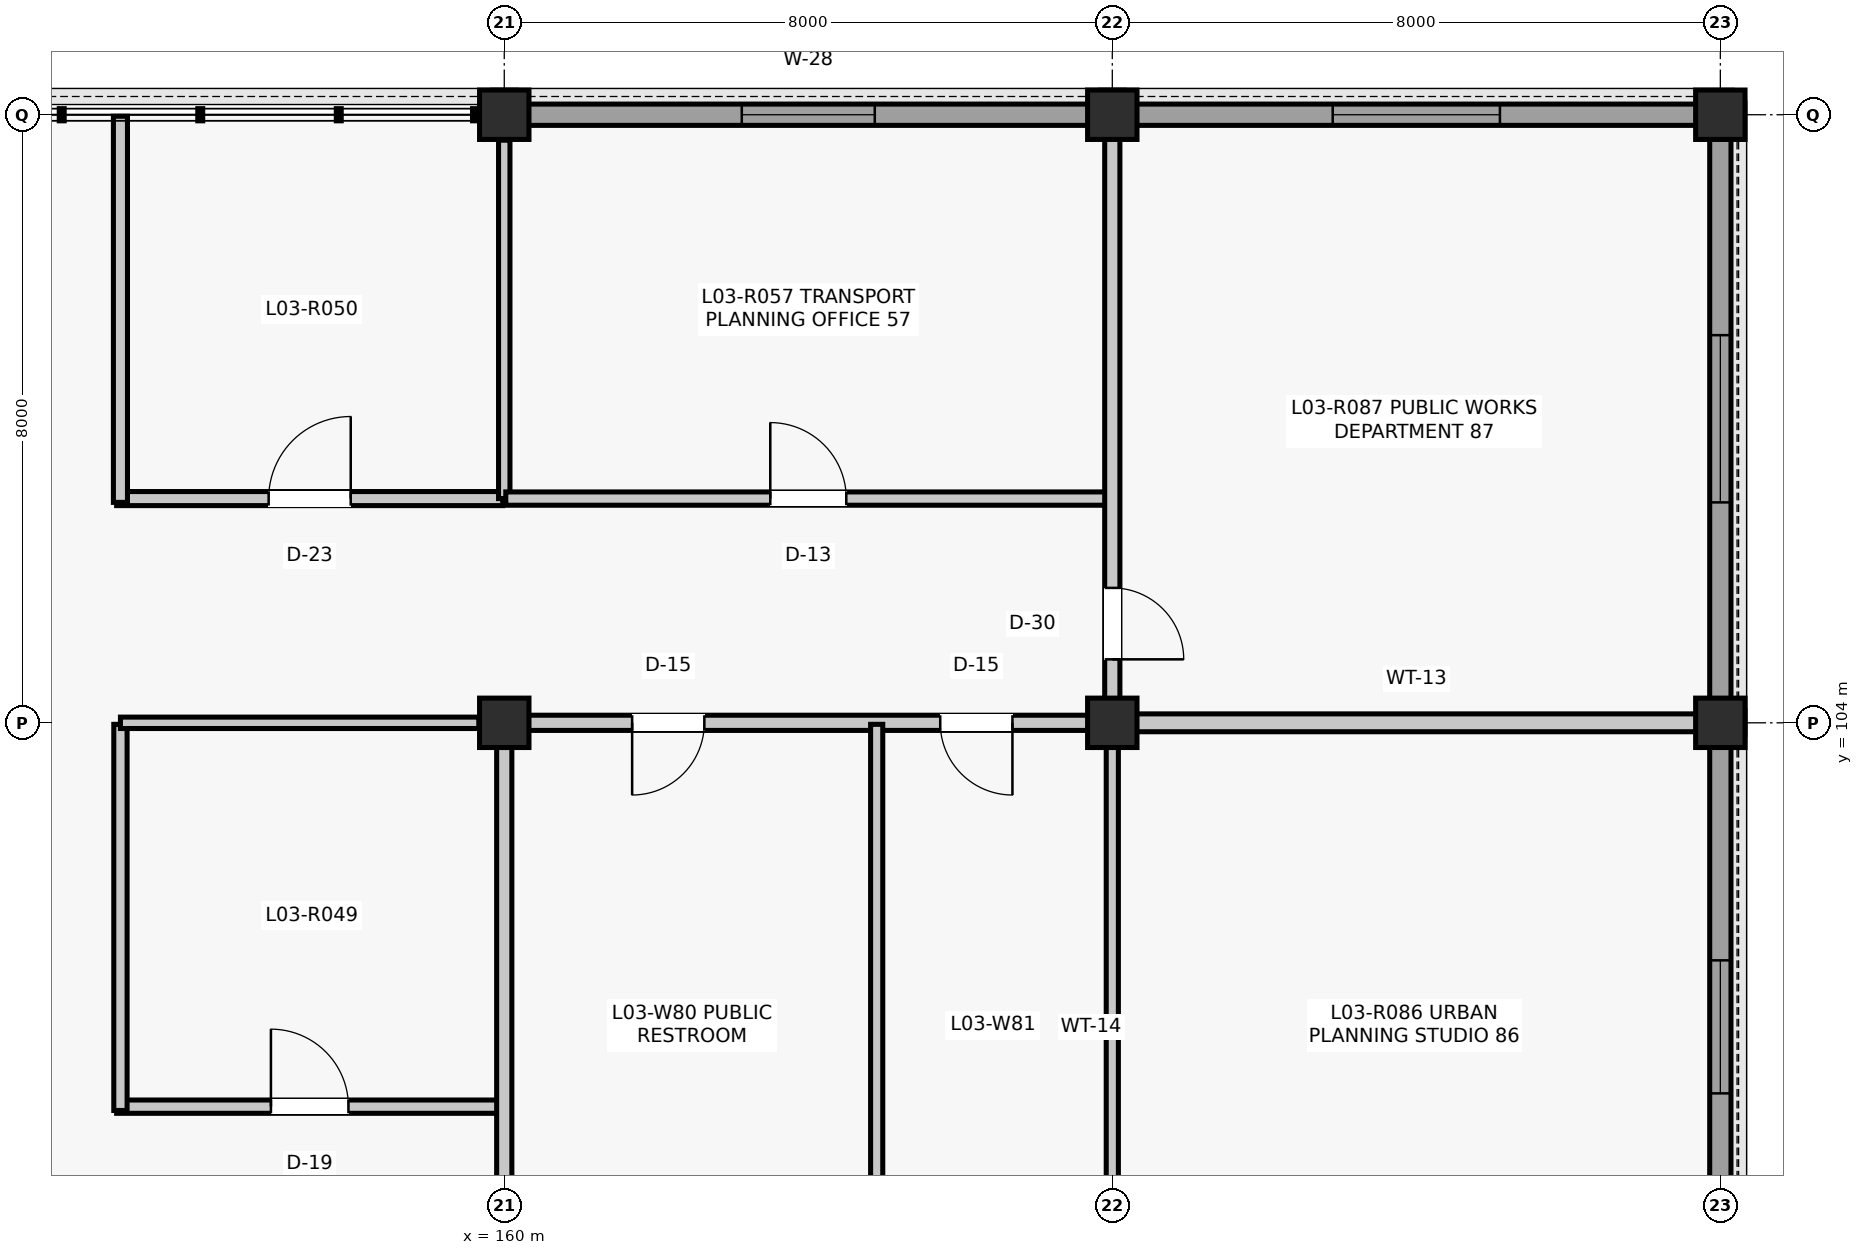
"""IFC4 building model, lengths in metres.
Left out: names, types, materials, properties, quantities, classifications, styles, units other than length and angle.
Written with IfcOpenShell. Run it as: python <this file> out.ifc"""

import sys

from ifc_helpers import new_model, si_unit, direction, frame, frame_2d, origin, origin_2d, place, context, subcontext, project, spatial, rectangle, extrude, element, fill, save


model = new_model("IFC4")
c1 = context("Model", 3, precision=1e-05, world=origin(), true_north=direction((0.0, 1.0)))
c2 = subcontext(c1, "Body", "Model", "MODEL_VIEW")
j1 = project(units=[si_unit("LENGTHUNIT", "METRE"), si_unit("PLANEANGLEUNIT", "RADIAN")], contexts=[c1])
p1 = place(None, origin())
s1 = spatial("IfcSite", under=j1, at=p1, CompositionType="ELEMENT")
p2 = place(p1, origin())
s2 = spatial("IfcBuilding", under=s1, at=p2, CompositionType="ELEMENT")
p3 = place(p2, frame((0.0, 0.0, 13.86)))
s3 = spatial("IfcBuildingStorey", under=s2, at=p3, CompositionType="ELEMENT", Elevation=13.86)
for number, where, z_axis, x_axis in (
    (1, (160.0, 104.0, 0.0), (0.0, 0.0, 1.0), (1.0, 0.0, 0.0)),
    (2, (160.0, 112.0, 0.0), (0.0, 0.0, 1.0), (1.0, 0.0, 0.0)),
    (3, (168.0, 104.0, 0.0), (0.0, 0.0, 1.0), (1.0, 0.0, 0.0)),
    (4, (168.0, 112.0, 0.0), (0.0, 0.0, 1.0), (1.0, 0.0, 0.0)),
    (5, (176.0, 104.0, 0.0), (0.0, 0.0, 1.0), (1.0, 0.0, 0.0)),
    (6, (176.0, 112.0, 0.0), (0.0, 0.0, 1.0), (1.0, 0.0, 0.0)),
):
    element("IfcColumn", number, at=place(p3, frame(where, z_axis=z_axis, x_axis=x_axis)), inside=s3, PredefinedType="COLUMN", context=c2, shape_type="SweptSolid", body=[
        extrude(rectangle(XDim=0.65, YDim=0.65, at=origin_2d()), origin(), (0.0, 0.0, 1.0), 3.96),
    ])
p4 = place(p3, frame((160.31, 112.0, 0.0), z_axis=(0.0, 0.0, 1.0), x_axis=(1.0, 0.0, 0.0)))
e7 = element("IfcWall", 7, at=p4, inside=s3, PredefinedType="SOLIDWALL", context=c2, shape_type="SweptSolid", body=[
    extrude(rectangle(XDim=7.38, YDim=0.28, at=frame_2d((3.69, 0.0))), origin(), (0.0, 0.0, 1.0), 3.364),
])
p5 = place(p4, frame((2.815, 0.0, 0.9)))
e8 = element("IfcOpeningElement", 8, at=p5, cuts=e7, PredefinedType="OPENING", context=c2, shape_type="SweptSolid", body=[
    extrude(rectangle(XDim=1.75, YDim=1.85, at=frame_2d((0.875, 0.925))), frame((0.0, 0.15, 0.0), z_axis=(0.0, -1.0, 0.0), x_axis=(1.0, 0.0, 0.0)), (0.0, 0.0, 1.0), 0.3),
])
p6 = place(p3, frame((176.0, 96.31, 0.0), z_axis=(0.0, 0.0, 1.0), x_axis=(0.0, 1.0, 0.0)))
e9 = element("IfcWall", 9, at=p6, inside=s3, PredefinedType="SOLIDWALL", context=c2, shape_type="SweptSolid", body=[
    extrude(rectangle(XDim=7.38, YDim=0.28, at=frame_2d((3.69, 0.0))), origin(), (0.0, 0.0, 1.0), 3.364),
])
p7 = place(p6, frame((2.815, 0.0, 0.9)))
e10 = element("IfcOpeningElement", 10, at=p7, cuts=e9, PredefinedType="OPENING", context=c2, shape_type="SweptSolid", body=[
    extrude(rectangle(XDim=1.75, YDim=1.85, at=frame_2d((0.875, 0.925))), frame((0.0, 0.15, 0.0), z_axis=(0.0, -1.0, 0.0), x_axis=(1.0, 0.0, 0.0)), (0.0, 0.0, 1.0), 0.3),
])
p8 = place(p3, frame((168.31, 112.0, 0.0), z_axis=(0.0, 0.0, 1.0), x_axis=(1.0, 0.0, 0.0)))
e11 = element("IfcWall", 11, at=p8, inside=s3, PredefinedType="SOLIDWALL", context=c2, shape_type="SweptSolid", body=[
    extrude(rectangle(XDim=7.38, YDim=0.28, at=frame_2d((3.69, 0.0))), origin(), (0.0, 0.0, 1.0), 3.304),
])
p9 = place(p8, frame((2.59, 0.0, 1.35)))
e12 = element("IfcOpeningElement", 12, at=p9, cuts=e11, PredefinedType="OPENING", context=c2, shape_type="SweptSolid", body=[
    extrude(rectangle(XDim=2.2, YDim=1.3, at=frame_2d((1.1, 0.65))), frame((0.0, 0.15, 0.0), z_axis=(0.0, -1.0, 0.0), x_axis=(1.0, 0.0, 0.0)), (0.0, 0.0, 1.0), 0.3),
])
p10 = place(p3, frame((176.0, 104.31, 0.0), z_axis=(0.0, 0.0, 1.0), x_axis=(0.0, 1.0, 0.0)))
e13 = element("IfcWall", 13, at=p10, inside=s3, PredefinedType="SOLIDWALL", context=c2, shape_type="SweptSolid", body=[
    extrude(rectangle(XDim=7.38, YDim=0.28, at=frame_2d((3.69, 0.0))), origin(), (0.0, 0.0, 1.0), 3.304),
])
p11 = place(p10, frame((2.59, 0.0, 1.35)))
e14 = element("IfcOpeningElement", 14, at=p11, cuts=e13, PredefinedType="OPENING", context=c2, shape_type="SweptSolid", body=[
    extrude(rectangle(XDim=2.2, YDim=1.3, at=frame_2d((1.1, 0.65))), frame((0.0, 0.15, 0.0), z_axis=(0.0, -1.0, 0.0), x_axis=(1.0, 0.0, 0.0)), (0.0, 0.0, 1.0), 0.3),
])
p12 = place(p3, frame((154.9, 98.95, 0.0), z_axis=(0.0, 0.0, 1.0), x_axis=(1.0, 0.0, 0.0)))
e15 = element("IfcWall", 15, at=p12, inside=s3, PredefinedType="PARTITIONING", context=c2, shape_type="SweptSolid", body=[
    extrude(rectangle(XDim=5.08, YDim=0.175, at=frame_2d((2.54, 0.0))), origin(), (0.0, 0.0, 1.0), 3.452),
])
p13 = place(p12, frame((2.03, 0.0, 0.0)))
e16 = element("IfcOpeningElement", 16, at=p13, cuts=e15, PredefinedType="OPENING", context=c2, shape_type="SweptSolid", body=[
    extrude(rectangle(XDim=1.02, YDim=2.2, at=frame_2d((0.51, 1.1))), frame((0.0, 0.097, 0.0), z_axis=(0.0, -1.0, 0.0), x_axis=(1.0, 0.0, 0.0)), (0.0, 0.0, 1.0), 0.195),
])
p14 = place(p3, frame((154.95, 98.9, 0.0), z_axis=(0.0, 0.0, 1.0), x_axis=(0.0, 1.0, 0.0)))
e17 = element("IfcWall", 17, at=p14, inside=s3, PredefinedType="PARTITIONING", context=c2, shape_type="SweptSolid", body=[
    extrude(rectangle(XDim=5.08, YDim=0.175, at=frame_2d((2.54, 0.0))), origin(), (0.0, 0.0, 1.0), 3.247),
])
p15 = place(p3, frame((154.95, 104.0, 0.0), z_axis=(0.0, 0.0, 1.0), x_axis=(1.0, 0.0, 0.0)))
e18 = element("IfcWall", 18, at=p15, inside=s3, PredefinedType="PARTITIONING", context=c2, shape_type="SweptSolid", body=[
    extrude(rectangle(XDim=4.715, YDim=0.15, at=frame_2d((2.357, 0.0))), origin(), (0.0, 0.0, 1.0), 3.247),
])
p16 = place(p3, frame((154.9, 106.95, 0.0), z_axis=(0.0, 0.0, 1.0), x_axis=(1.0, 0.0, 0.0)))
e19 = element("IfcWall", 19, at=p16, inside=s3, PredefinedType="PARTITIONING", context=c2, shape_type="SweptSolid", body=[
    extrude(rectangle(XDim=5.08, YDim=0.185, at=frame_2d((2.54, 0.0))), origin(), (0.0, 0.0, 1.0), 3.247),
])
p17 = place(p16, frame((2.0, 0.0, 0.0)))
e20 = element("IfcOpeningElement", 20, at=p17, cuts=e19, PredefinedType="OPENING", context=c2, shape_type="SweptSolid", body=[
    extrude(rectangle(XDim=1.08, YDim=2.2, at=frame_2d((0.54, 1.1))), frame((0.0, 0.103, 0.0), z_axis=(0.0, -1.0, 0.0), x_axis=(1.0, 0.0, 0.0)), (0.0, 0.0, 1.0), 0.205),
])
p18 = place(p3, frame((154.95, 106.9, 0.0), z_axis=(0.0, 0.0, 1.0), x_axis=(0.0, 1.0, 0.0)))
e21 = element("IfcWall", 21, at=p18, inside=s3, PredefinedType="PARTITIONING", context=c2, shape_type="SweptSolid", body=[
    extrude(rectangle(XDim=5.08, YDim=0.185, at=frame_2d((2.54, 0.0))), origin(), (0.0, 0.0, 1.0), 3.293),
])
p19 = place(p3, frame((160.0, 106.95, 0.0), z_axis=(0.0, 0.0, 1.0), x_axis=(0.0, 1.0, 0.0)))
e22 = element("IfcWall", 22, at=p19, inside=s3, PredefinedType="PARTITIONING", context=c2, shape_type="SweptSolid", body=[
    extrude(rectangle(XDim=4.715, YDim=0.15, at=frame_2d((2.357, 0.0))), origin(), (0.0, 0.0, 1.0), 3.247),
])
p20 = place(p3, frame((160.02, 106.95, 0.0), z_axis=(0.0, 0.0, 1.0), x_axis=(1.0, 0.0, 0.0)))
e23 = element("IfcWall", 23, at=p20, inside=s3, PredefinedType="PARTITIONING", context=c2, shape_type="SweptSolid", body=[
    extrude(rectangle(XDim=7.96, YDim=0.175, at=frame_2d((3.98, 0.0))), origin(), (0.0, 0.0, 1.0), 3.247),
])
p21 = place(p20, frame((3.48, 0.0, 0.0)))
e24 = element("IfcOpeningElement", 24, at=p21, cuts=e23, PredefinedType="OPENING", context=c2, shape_type="SweptSolid", body=[
    extrude(rectangle(XDim=1.0, YDim=2.15, at=frame_2d((0.5, 1.075))), frame((0.0, 0.097, 0.0), z_axis=(0.0, -1.0, 0.0), x_axis=(1.0, 0.0, 0.0)), (0.0, 0.0, 1.0), 0.195),
])
p22 = place(p3, frame((160.0, 96.34, 0.0), z_axis=(0.0, 0.0, 1.0), x_axis=(0.0, 1.0, 0.0)))
e25 = element("IfcWall", 25, at=p22, inside=s3, PredefinedType="PARTITIONING", context=c2, shape_type="SweptSolid", body=[
    extrude(rectangle(XDim=7.345, YDim=0.2, at=frame_2d((3.672, 0.0))), origin(), (0.0, 0.0, 1.0), 3.452),
])
p23 = place(p22, frame((0.52, 0.0, 0.0)))
e26 = element("IfcOpeningElement", 26, at=p23, cuts=e25, PredefinedType="OPENING", context=c2, shape_type="SweptSolid", body=[
    extrude(rectangle(XDim=0.94, YDim=2.12, at=frame_2d((0.47, 1.06))), frame((0.0, 0.11, 0.0), z_axis=(0.0, -1.0, 0.0), x_axis=(1.0, 0.0, 0.0)), (0.0, 0.0, 1.0), 0.22),
])
p24 = place(p3, frame((168.0, 96.34, 0.0), z_axis=(0.0, 0.0, 1.0), x_axis=(0.0, 1.0, 0.0)))
e27 = element("IfcWall", 27, at=p24, inside=s3, PredefinedType="PARTITIONING", context=c2, shape_type="SweptSolid", body=[
    extrude(rectangle(XDim=7.345, YDim=0.16, at=frame_2d((3.672, 0.0))), origin(), (0.0, 0.0, 1.0), 3.247),
])
p25 = place(p3, frame((160.315, 104.0, 0.0), z_axis=(0.0, 0.0, 1.0), x_axis=(1.0, 0.0, 0.0)))
e28 = element("IfcWall", 28, at=p25, inside=s3, PredefinedType="PARTITIONING", context=c2, shape_type="SweptSolid", body=[
    extrude(rectangle(XDim=7.37, YDim=0.2, at=frame_2d((3.685, 0.0))), origin(), (0.0, 0.0, 1.0), 3.253),
])
p26 = place(p25, frame((1.367, 0.0, 0.0)))
e29 = element("IfcOpeningElement", 29, at=p26, cuts=e28, PredefinedType="OPENING", context=c2, shape_type="SweptSolid", body=[
    extrude(rectangle(XDim=0.95, YDim=2.1, at=frame_2d((0.475, 1.05))), frame((0.0, 0.11, 0.0), z_axis=(0.0, -1.0, 0.0), x_axis=(1.0, 0.0, 0.0)), (0.0, 0.0, 1.0), 0.22),
])
p27 = place(p25, frame((5.421, 0.0, 0.0)))
e30 = element("IfcOpeningElement", 30, at=p27, cuts=e28, PredefinedType="OPENING", context=c2, shape_type="SweptSolid", body=[
    extrude(rectangle(XDim=0.95, YDim=2.1, at=frame_2d((0.475, 1.05))), frame((0.0, 0.11, 0.0), z_axis=(0.0, -1.0, 0.0), x_axis=(1.0, 0.0, 0.0)), (0.0, 0.0, 1.0), 0.22),
])
p28 = place(p3, frame((168.0, 104.315, 0.0), z_axis=(0.0, 0.0, 1.0), x_axis=(0.0, 1.0, 0.0)))
e31 = element("IfcWall", 31, at=p28, inside=s3, PredefinedType="PARTITIONING", context=c2, shape_type="SweptSolid", body=[
    extrude(rectangle(XDim=7.37, YDim=0.2, at=frame_2d((3.685, 0.0))), origin(), (0.0, 0.0, 1.0), 3.253),
])
p29 = place(p28, frame((0.52, 0.0, 0.0)))
e32 = element("IfcOpeningElement", 32, at=p29, cuts=e31, PredefinedType="OPENING", context=c2, shape_type="SweptSolid", body=[
    extrude(rectangle(XDim=0.94, YDim=2.12, at=frame_2d((0.47, 1.06))), frame((0.0, 0.11, 0.0), z_axis=(0.0, -1.0, 0.0), x_axis=(1.0, 0.0, 0.0)), (0.0, 0.0, 1.0), 0.22),
])
p30 = place(p3, frame((168.315, 104.0, 0.0), z_axis=(0.0, 0.0, 1.0), x_axis=(1.0, 0.0, 0.0)))
e33 = element("IfcWall", 33, at=p30, inside=s3, PredefinedType="PARTITIONING", context=c2, shape_type="SweptSolid", body=[
    extrude(rectangle(XDim=7.37, YDim=0.235, at=frame_2d((3.685, 0.0))), origin(), (0.0, 0.0, 1.0), 3.241),
])
p31 = place(p3, frame((164.9, 96.02, 0.0), z_axis=(0.0, 0.0, 1.0), x_axis=(0.0, 1.0, 0.0)))
e34 = element("IfcWall", 34, at=p31, inside=s3, PredefinedType="PARTITIONING", context=c2, shape_type="SweptSolid", body=[
    extrude(rectangle(XDim=7.96, YDim=0.16, at=frame_2d((3.98, 0.0))), origin(), (0.0, 0.0, 1.0), 3.247),
])
p32 = place(p5, origin())
e35 = element("IfcWindow", 35, at=p32, inside=s3, PartitioningType="SINGLE_PANEL", PredefinedType="WINDOW", context=c2, shape_type="SweptSolid", body=[
    extrude(rectangle(XDim=1.75, YDim=1.85, at=frame_2d((0.875, 0.925))), frame((0.0, 0.03, 0.0), z_axis=(0.0, -1.0, 0.0), x_axis=(1.0, 0.0, 0.0)), (0.0, 0.0, 1.0), 0.06),
])
fill(e8, e35)
p33 = place(p7, origin())
e36 = element("IfcWindow", 36, at=p33, inside=s3, PartitioningType="SINGLE_PANEL", PredefinedType="WINDOW", context=c2, shape_type="SweptSolid", body=[
    extrude(rectangle(XDim=1.75, YDim=1.85, at=frame_2d((0.875, 0.925))), frame((0.0, 0.03, 0.0), z_axis=(0.0, -1.0, 0.0), x_axis=(1.0, 0.0, 0.0)), (0.0, 0.0, 1.0), 0.06),
])
fill(e10, e36)
p34 = place(p9, origin())
e37 = element("IfcWindow", 37, at=p34, inside=s3, PartitioningType="SINGLE_PANEL", PredefinedType="WINDOW", context=c2, shape_type="SweptSolid", body=[
    extrude(rectangle(XDim=2.2, YDim=1.3, at=frame_2d((1.1, 0.65))), frame((0.0, 0.03, 0.0), z_axis=(0.0, -1.0, 0.0), x_axis=(1.0, 0.0, 0.0)), (0.0, 0.0, 1.0), 0.06),
])
fill(e12, e37)
p35 = place(p11, origin())
e38 = element("IfcWindow", 38, at=p35, inside=s3, PartitioningType="SINGLE_PANEL", PredefinedType="WINDOW", context=c2, shape_type="SweptSolid", body=[
    extrude(rectangle(XDim=2.2, YDim=1.3, at=frame_2d((1.1, 0.65))), frame((0.0, 0.03, 0.0), z_axis=(0.0, -1.0, 0.0), x_axis=(1.0, 0.0, 0.0)), (0.0, 0.0, 1.0), 0.06),
])
fill(e14, e38)
p36 = place(p13, origin())
e39 = element("IfcDoor", 39, at=p36, inside=s3, OperationType="SINGLE_SWING_LEFT", PredefinedType="DOOR", context=c2, shape_type="SweptSolid", body=[
    extrude(rectangle(XDim=1.02, YDim=2.2, at=frame_2d((0.51, 1.1))), frame((0.0, 0.025, 0.0), z_axis=(0.0, -1.0, 0.0), x_axis=(1.0, 0.0, 0.0)), (0.0, 0.0, 1.0), 0.05),
])
fill(e16, e39)
p37 = place(p17, origin())
e40 = element("IfcDoor", 40, at=p37, inside=s3, OperationType="SINGLE_SWING_RIGHT", PredefinedType="DOOR", context=c2, shape_type="SweptSolid", body=[
    extrude(rectangle(XDim=1.08, YDim=2.2, at=frame_2d((0.54, 1.1))), frame((0.0, 0.025, 0.0), z_axis=(0.0, -1.0, 0.0), x_axis=(1.0, 0.0, 0.0)), (0.0, 0.0, 1.0), 0.05),
])
fill(e20, e40)
p38 = place(p21, origin())
e41 = element("IfcDoor", 41, at=p38, inside=s3, OperationType="SINGLE_SWING_LEFT", PredefinedType="DOOR", context=c2, shape_type="SweptSolid", body=[
    extrude(rectangle(XDim=1.0, YDim=2.15, at=frame_2d((0.5, 1.075))), frame((0.0, 0.025, 0.0), z_axis=(0.0, -1.0, 0.0), x_axis=(1.0, 0.0, 0.0)), (0.0, 0.0, 1.0), 0.05),
])
fill(e24, e41)
p39 = place(p26, frame((0.95, 0.0, 0.0), z_axis=(0.0, 0.0, 1.0), x_axis=(-1.0, 0.0, 0.0)))
e42 = element("IfcDoor", 42, at=p39, inside=s3, OperationType="SINGLE_SWING_LEFT", PredefinedType="DOOR", context=c2, shape_type="SweptSolid", body=[
    extrude(rectangle(XDim=0.95, YDim=2.1, at=frame_2d((0.475, 1.05))), frame((0.0, 0.025, 0.0), z_axis=(0.0, -1.0, 0.0), x_axis=(1.0, 0.0, 0.0)), (0.0, 0.0, 1.0), 0.05),
])
fill(e29, e42)
p40 = place(p27, frame((0.95, 0.0, 0.0), z_axis=(0.0, 0.0, 1.0), x_axis=(-1.0, 0.0, 0.0)))
e43 = element("IfcDoor", 43, at=p40, inside=s3, OperationType="SINGLE_SWING_RIGHT", PredefinedType="DOOR", context=c2, shape_type="SweptSolid", body=[
    extrude(rectangle(XDim=0.95, YDim=2.1, at=frame_2d((0.475, 1.05))), frame((0.0, 0.025, 0.0), z_axis=(0.0, -1.0, 0.0), x_axis=(1.0, 0.0, 0.0)), (0.0, 0.0, 1.0), 0.05),
])
fill(e30, e43)
p41 = place(p29, frame((0.94, 0.0, 0.0), z_axis=(0.0, 0.0, 1.0), x_axis=(-1.0, 0.0, 0.0)))
e44 = element("IfcDoor", 44, at=p41, inside=s3, OperationType="SINGLE_SWING_LEFT", PredefinedType="DOOR", context=c2, shape_type="SweptSolid", body=[
    extrude(rectangle(XDim=0.94, YDim=2.12, at=frame_2d((0.47, 1.06))), frame((0.0, 0.025, 0.0), z_axis=(0.0, -1.0, 0.0), x_axis=(1.0, 0.0, 0.0)), (0.0, 0.0, 1.0), 0.05),
])
fill(e32, e44)
save(model, sys.argv[1])
